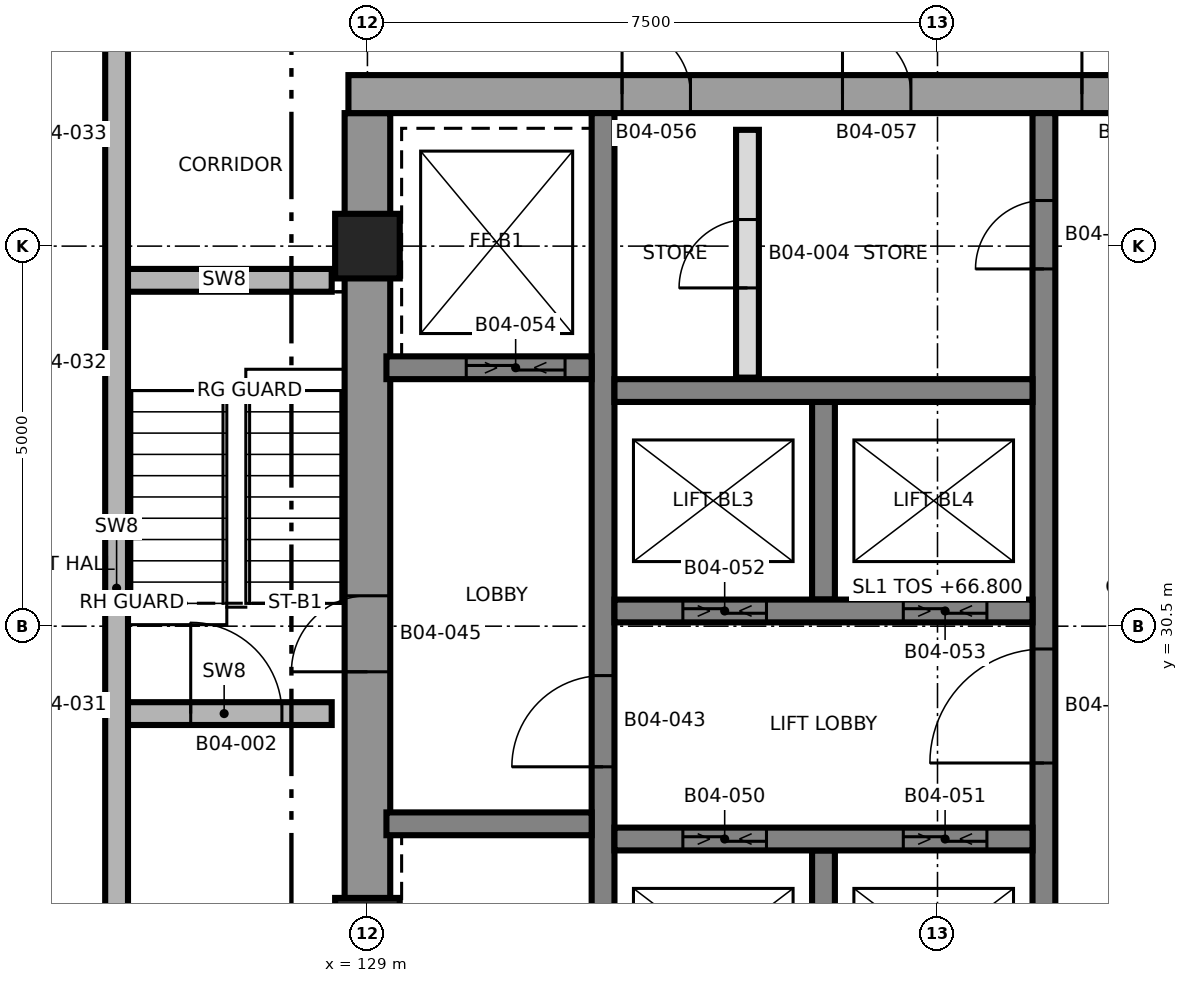
"""IFC4 building model, lengths in metres.
Left out: names, types, materials, properties, quantities, classifications, styles, units other than length and angle.
Written with IfcOpenShell. Run it as: python <this file> out.ifc"""

import sys

from ifc_helpers import new_model, si_unit, direction, frame, frame_2d, origin, origin_2d, place, context, subcontext, project, spatial, rectangle, extrude, element, fill, save


model = new_model("IFC4")
c1 = context("Model", 3, precision=1e-05, world=origin(), true_north=direction((0.0, 1.0)))
c2 = subcontext(c1, "Body", "Model", "MODEL_VIEW")
j1 = project(units=[si_unit("LENGTHUNIT", "METRE"), si_unit("PLANEANGLEUNIT", "RADIAN")], contexts=[c1])
p1 = place(None, origin())
s1 = spatial("IfcSite", under=j1, at=p1, CompositionType="ELEMENT")
p2 = place(p1, origin())
s2 = spatial("IfcBuilding", under=s1, at=p2, CompositionType="ELEMENT")
p3 = place(p2, frame((0.0, 0.0, 66.8)))
s3 = spatial("IfcBuildingStorey", under=s2, at=p3, CompositionType="ELEMENT", Elevation=66.8)
p4 = place(p3, frame((129.0, 24.75, 0.0), z_axis=(0.0, 0.0, 1.0), x_axis=(0.0, 1.0, 0.0)))
e1 = element("IfcWall", 1, at=p4, inside=s3, PredefinedType="SHEAR", context=c2, shape_type="SweptSolid", body=[
    extrude(rectangle(XDim=12.5, YDim=0.6, at=frame_2d((6.25, 0.0))), origin(), (0.0, 0.0, 1.0), 3.7),
])
p5 = place(p4, frame((5.15, 0.0, 0.0)))
e2 = element("IfcOpeningElement", 2, at=p5, cuts=e1, PredefinedType="OPENING", context=c2, shape_type="SweptSolid", body=[
    extrude(rectangle(XDim=1.0, YDim=2.1, at=frame_2d((0.5, 1.05))), frame((0.0, 0.31, 0.0), z_axis=(0.0, -1.0, 0.0), x_axis=(1.0, 0.0, 0.0)), (0.0, 0.0, 1.0), 0.62),
])
p6 = place(p3, frame((128.75, 37.5, 0.0), z_axis=(0.0, 0.0, 1.0), x_axis=(1.0, 0.0, 0.0)))
e3 = element("IfcWall", 3, at=p6, inside=s3, PredefinedType="SHEAR", context=c2, shape_type="SweptSolid", body=[
    extrude(rectangle(XDim=15.0, YDim=0.5, at=frame_2d((7.5, 0.0))), origin(), (0.0, 0.0, 1.0), 3.7),
])
p7 = place(p6, frame((9.65, 0.0, 0.0)))
e4 = element("IfcOpeningElement", 4, at=p7, cuts=e3, PredefinedType="OPENING", context=c2, shape_type="SweptSolid", body=[
    extrude(rectangle(XDim=1.5, YDim=2.1, at=frame_2d((0.75, 1.05))), frame((0.0, 0.26, 0.0), z_axis=(0.0, -1.0, 0.0), x_axis=(1.0, 0.0, 0.0)), (0.0, 0.0, 1.0), 0.52),
])
p8 = place(p6, frame((12.85, 0.0, 0.0)))
e5 = element("IfcOpeningElement", 5, at=p8, cuts=e3, PredefinedType="OPENING", context=c2, shape_type="SweptSolid", body=[
    extrude(rectangle(XDim=0.9, YDim=2.1, at=frame_2d((0.45, 1.05))), frame((0.0, 0.26, 0.0), z_axis=(0.0, -1.0, 0.0), x_axis=(1.0, 0.0, 0.0)), (0.0, 0.0, 1.0), 0.52),
])
p9 = place(p6, frame((3.6, 0.0, 0.0)))
e6 = element("IfcOpeningElement", 6, at=p9, cuts=e3, PredefinedType="OPENING", context=c2, shape_type="SweptSolid", body=[
    extrude(rectangle(XDim=0.9, YDim=2.1, at=frame_2d((0.45, 1.05))), frame((0.0, 0.26, 0.0), z_axis=(0.0, -1.0, 0.0), x_axis=(1.0, 0.0, 0.0)), (0.0, 0.0, 1.0), 0.52),
])
p10 = place(p6, frame((6.5, 0.0, 0.0)))
e7 = element("IfcOpeningElement", 7, at=p10, cuts=e3, PredefinedType="OPENING", context=c2, shape_type="SweptSolid", body=[
    extrude(rectangle(XDim=0.9, YDim=2.1, at=frame_2d((0.45, 1.05))), frame((0.0, 0.26, 0.0), z_axis=(0.0, -1.0, 0.0), x_axis=(1.0, 0.0, 0.0)), (0.0, 0.0, 1.0), 0.52),
])
p11 = place(p3, frame((132.1, 24.75, 0.0), z_axis=(0.0, 0.0, 1.0), x_axis=(0.0, 1.0, 0.0)))
e8 = element("IfcWall", 8, at=p11, inside=s3, PredefinedType="SHEAR", context=c2, shape_type="SweptSolid", body=[
    extrude(rectangle(XDim=12.5, YDim=0.3, at=frame_2d((6.25, 0.0))), origin(), (0.0, 0.0, 1.0), 3.7),
])
p12 = place(p11, frame((3.9, 0.0, 0.0)))
e9 = element("IfcOpeningElement", 9, at=p12, cuts=e8, PredefinedType="OPENING", context=c2, shape_type="SweptSolid", body=[
    extrude(rectangle(XDim=1.2, YDim=2.1, at=frame_2d((0.6, 1.05))), frame((0.0, 0.16, 0.0), z_axis=(0.0, -1.0, 0.0), x_axis=(1.0, 0.0, 0.0)), (0.0, 0.0, 1.0), 0.32),
])
p13 = place(p3, frame((137.9, 24.75, 0.0), z_axis=(0.0, 0.0, 1.0), x_axis=(0.0, 1.0, 0.0)))
e10 = element("IfcWall", 10, at=p13, inside=s3, PredefinedType="SHEAR", context=c2, shape_type="SweptSolid", body=[
    extrude(rectangle(XDim=12.5, YDim=0.3, at=frame_2d((6.25, 0.0))), origin(), (0.0, 0.0, 1.0), 3.7),
])
p14 = place(p13, frame((3.95, 0.0, 0.0)))
e11 = element("IfcOpeningElement", 11, at=p14, cuts=e10, PredefinedType="OPENING", context=c2, shape_type="SweptSolid", body=[
    extrude(rectangle(XDim=1.5, YDim=2.1, at=frame_2d((0.75, 1.05))), frame((0.0, 0.16, 0.0), z_axis=(0.0, -1.0, 0.0), x_axis=(1.0, 0.0, 0.0)), (0.0, 0.0, 1.0), 0.32),
])
p15 = place(p13, frame((10.45, 0.0, 0.0)))
e12 = element("IfcOpeningElement", 12, at=p15, cuts=e10, PredefinedType="OPENING", context=c2, shape_type="SweptSolid", body=[
    extrude(rectangle(XDim=0.9, YDim=2.1, at=frame_2d((0.45, 1.05))), frame((0.0, 0.16, 0.0), z_axis=(0.0, -1.0, 0.0), x_axis=(1.0, 0.0, 0.0)), (0.0, 0.0, 1.0), 0.32),
])
p16 = place(p3, frame((135.0, 24.75, 0.0), z_axis=(0.0, 0.0, 1.0), x_axis=(0.0, 1.0, 0.0)))
e13 = element("IfcWall", 13, at=p16, inside=s3, PredefinedType="SHEAR", context=c2, shape_type="SweptSolid", body=[
    extrude(rectangle(XDim=2.8, YDim=0.3, at=frame_2d((1.4, 0.0))), origin(), (0.0, 0.0, 1.0), 3.7),
])
p17 = place(p3, frame((135.0, 30.85, 0.0), z_axis=(0.0, 0.0, 1.0), x_axis=(0.0, 1.0, 0.0)))
e14 = element("IfcWall", 14, at=p17, inside=s3, PredefinedType="SHEAR", context=c2, shape_type="SweptSolid", body=[
    extrude(rectangle(XDim=2.6, YDim=0.3, at=frame_2d((1.3, 0.0))), origin(), (0.0, 0.0, 1.0), 3.7),
])
p18 = place(p3, frame((132.25, 27.7, 0.0), z_axis=(0.0, 0.0, 1.0), x_axis=(1.0, 0.0, 0.0)))
e15 = element("IfcWall", 15, at=p18, inside=s3, PredefinedType="SHEAR", context=c2, shape_type="SweptSolid", body=[
    extrude(rectangle(XDim=5.5, YDim=0.3, at=frame_2d((2.75, 0.0))), origin(), (0.0, 0.0, 1.0), 3.7),
])
p19 = place(p18, frame((0.9, 0.0, 0.0)))
e16 = element("IfcOpeningElement", 16, at=p19, cuts=e15, PredefinedType="OPENING", context=c2, shape_type="SweptSolid", body=[
    extrude(rectangle(XDim=1.1, YDim=2.4, at=frame_2d((0.55, 1.2))), frame((0.0, 0.16, 0.0), z_axis=(0.0, -1.0, 0.0), x_axis=(1.0, 0.0, 0.0)), (0.0, 0.0, 1.0), 0.32),
])
p20 = place(p18, frame((3.8, 0.0, 0.0)))
e17 = element("IfcOpeningElement", 17, at=p20, cuts=e15, PredefinedType="OPENING", context=c2, shape_type="SweptSolid", body=[
    extrude(rectangle(XDim=1.1, YDim=2.4, at=frame_2d((0.55, 1.2))), frame((0.0, 0.16, 0.0), z_axis=(0.0, -1.0, 0.0), x_axis=(1.0, 0.0, 0.0)), (0.0, 0.0, 1.0), 0.32),
])
p21 = place(p3, frame((132.25, 30.7, 0.0), z_axis=(0.0, 0.0, 1.0), x_axis=(1.0, 0.0, 0.0)))
e18 = element("IfcWall", 18, at=p21, inside=s3, PredefinedType="SHEAR", context=c2, shape_type="SweptSolid", body=[
    extrude(rectangle(XDim=5.5, YDim=0.3, at=frame_2d((2.75, 0.0))), origin(), (0.0, 0.0, 1.0), 3.7),
])
p22 = place(p21, frame((0.9, 0.0, 0.0)))
e19 = element("IfcOpeningElement", 19, at=p22, cuts=e18, PredefinedType="OPENING", context=c2, shape_type="SweptSolid", body=[
    extrude(rectangle(XDim=1.1, YDim=2.4, at=frame_2d((0.55, 1.2))), frame((0.0, 0.16, 0.0), z_axis=(0.0, -1.0, 0.0), x_axis=(1.0, 0.0, 0.0)), (0.0, 0.0, 1.0), 0.32),
])
p23 = place(p21, frame((3.8, 0.0, 0.0)))
e20 = element("IfcOpeningElement", 20, at=p23, cuts=e18, PredefinedType="OPENING", context=c2, shape_type="SweptSolid", body=[
    extrude(rectangle(XDim=1.1, YDim=2.4, at=frame_2d((0.55, 1.2))), frame((0.0, 0.16, 0.0), z_axis=(0.0, -1.0, 0.0), x_axis=(1.0, 0.0, 0.0)), (0.0, 0.0, 1.0), 0.32),
])
p24 = place(p3, frame((132.25, 33.6, 0.0), z_axis=(0.0, 0.0, 1.0), x_axis=(1.0, 0.0, 0.0)))
e21 = element("IfcWall", 21, at=p24, inside=s3, PredefinedType="SHEAR", context=c2, shape_type="SweptSolid", body=[
    extrude(rectangle(XDim=5.5, YDim=0.3, at=frame_2d((2.75, 0.0))), origin(), (0.0, 0.0, 1.0), 3.7),
])
p25 = place(p3, frame((129.25, 27.9, 0.0), z_axis=(0.0, 0.0, 1.0), x_axis=(1.0, 0.0, 0.0)))
e22 = element("IfcWall", 22, at=p25, inside=s3, PredefinedType="SHEAR", context=c2, shape_type="SweptSolid", body=[
    extrude(rectangle(XDim=2.7, YDim=0.3, at=frame_2d((1.35, 0.0))), origin(), (0.0, 0.0, 1.0), 3.7),
])
p26 = place(p3, frame((129.25, 33.9, 0.0), z_axis=(0.0, 0.0, 1.0), x_axis=(1.0, 0.0, 0.0)))
e23 = element("IfcWall", 23, at=p26, inside=s3, PredefinedType="SHEAR", context=c2, shape_type="SweptSolid", body=[
    extrude(rectangle(XDim=2.7, YDim=0.3, at=frame_2d((1.35, 0.0))), origin(), (0.0, 0.0, 1.0), 3.7),
])
p27 = place(p26, frame((1.05, 0.0, 0.0)))
e24 = element("IfcOpeningElement", 24, at=p27, cuts=e23, PredefinedType="OPENING", context=c2, shape_type="SweptSolid", body=[
    extrude(rectangle(XDim=1.3, YDim=2.4, at=frame_2d((0.65, 1.2))), frame((0.0, 0.16, 0.0), z_axis=(0.0, -1.0, 0.0), x_axis=(1.0, 0.0, 0.0)), (0.0, 0.0, 1.0), 0.32),
])
for number, where, z_axis, x_axis in (
    (25, (129.0, 26.5, 0.0), (0.0, 0.0, 1.0), (1.0, 0.0, 0.0)),
    (26, (129.0, 35.5, 0.0), (0.0, 0.0, 1.0), (1.0, 0.0, 0.0)),
):
    element("IfcColumn", number, at=place(p3, frame(where, z_axis=z_axis, x_axis=x_axis)), inside=s3, PredefinedType="COLUMN", context=c2, shape_type="SweptSolid", body=[
        extrude(rectangle(XDim=0.85, YDim=0.85, at=origin_2d()), origin(), (0.0, 0.0, 1.0), 3.7),
    ])
p28 = place(p3, frame((125.7, 29.35, 0.0), z_axis=(0.0, 0.0, 1.0), x_axis=(1.0, 0.0, 0.0)))
e27 = element("IfcWall", 27, at=p28, inside=s3, PredefinedType="SHEAR", context=c2, shape_type="SweptSolid", body=[
    extrude(rectangle(XDim=2.83, YDim=0.3, at=frame_2d((1.415, 0.0))), origin(), (0.0, 0.0, 1.0), 3.4),
])
p29 = place(p28, frame((0.975, 0.0, 0.0)))
e28 = element("IfcOpeningElement", 28, at=p29, cuts=e27, PredefinedType="OPENING", context=c2, shape_type="SweptSolid", body=[
    extrude(rectangle(XDim=1.2, YDim=2.1, at=frame_2d((0.6, 1.05))), frame((0.0, 0.16, 0.0), z_axis=(0.0, -1.0, 0.0), x_axis=(1.0, 0.0, 0.0)), (0.0, 0.0, 1.0), 0.32),
])
p30 = place(p3, frame((125.7, 35.05, 0.0), z_axis=(0.0, 0.0, 1.0), x_axis=(1.0, 0.0, 0.0)))
e29 = element("IfcWall", 29, at=p30, inside=s3, PredefinedType="SHEAR", context=c2, shape_type="SweptSolid", body=[
    extrude(rectangle(XDim=2.83, YDim=0.3, at=frame_2d((1.415, 0.0))), origin(), (0.0, 0.0, 1.0), 3.4),
])
p31 = place(p3, frame((125.7, 22.15, 0.0), z_axis=(0.0, 0.0, 1.0), x_axis=(0.0, 1.0, 0.0)))
e30 = element("IfcWall", 30, at=p31, inside=s3, PredefinedType="SHEAR", context=c2, shape_type="SweptSolid", body=[
    extrude(rectangle(XDim=17.7, YDim=0.3, at=frame_2d((8.85, 0.0))), origin(), (0.0, 0.0, 1.0), 3.4),
])
p32 = place(p31, frame((2.7, 0.0, 0.0)))
e31 = element("IfcOpeningElement", 31, at=p32, cuts=e30, PredefinedType="OPENING", context=c2, shape_type="SweptSolid", body=[
    extrude(rectangle(XDim=1.0, YDim=2.1, at=frame_2d((0.5, 1.05))), frame((0.0, 0.16, 0.0), z_axis=(0.0, -1.0, 0.0), x_axis=(1.0, 0.0, 0.0)), (0.0, 0.0, 1.0), 0.32),
])
p33 = place(p3, frame((134.0, 33.77, 0.0), z_axis=(0.0, 0.0, 1.0), x_axis=(0.0, 1.0, 0.0)))
e32 = element("IfcWall", 32, at=p33, inside=s3, PredefinedType="PARTITIONING", context=c2, shape_type="SweptSolid", body=[
    extrude(rectangle(XDim=3.26, YDim=0.3, at=frame_2d((1.63, 0.0))), origin(), (0.0, 0.0, 1.0), 3.4),
])
p34 = place(p33, frame((1.18, 0.0, 0.0)))
e33 = element("IfcOpeningElement", 33, at=p34, cuts=e32, PredefinedType="OPENING", context=c2, shape_type="SweptSolid", body=[
    extrude(rectangle(XDim=0.9, YDim=2.1, at=frame_2d((0.45, 1.05))), frame((0.0, 0.16, 0.0), z_axis=(0.0, -1.0, 0.0), x_axis=(1.0, 0.0, 0.0)), (0.0, 0.0, 1.0), 0.32),
])
p35 = place(p29, origin())
e34 = element("IfcDoor", 34, at=p35, inside=s3, OperationType="SINGLE_SWING_RIGHT", PredefinedType="DOOR", context=c2, shape_type="SweptSolid", body=[
    extrude(rectangle(XDim=1.2, YDim=2.1, at=frame_2d((0.6, 1.05))), frame((0.0, 0.025, 0.0), z_axis=(0.0, -1.0, 0.0), x_axis=(1.0, 0.0, 0.0)), (0.0, 0.0, 1.0), 0.05),
])
fill(e28, e34)
p36 = place(p34, origin())
e35 = element("IfcDoor", 35, at=p36, inside=s3, OperationType="SINGLE_SWING_RIGHT", PredefinedType="DOOR", context=c2, shape_type="SweptSolid", body=[
    extrude(rectangle(XDim=0.9, YDim=2.1, at=frame_2d((0.45, 1.05))), frame((0.0, 0.025, 0.0), z_axis=(0.0, -1.0, 0.0), x_axis=(1.0, 0.0, 0.0)), (0.0, 0.0, 1.0), 0.05),
])
fill(e33, e35)
p37 = place(p14, origin())
e36 = element("IfcDoor", 36, at=p37, inside=s3, OperationType="SINGLE_SWING_RIGHT", PredefinedType="DOOR", context=c2, shape_type="SweptSolid", body=[
    extrude(rectangle(XDim=1.5, YDim=2.1, at=frame_2d((0.75, 1.05))), frame((0.0, 0.025, 0.0), z_axis=(0.0, -1.0, 0.0), x_axis=(1.0, 0.0, 0.0)), (0.0, 0.0, 1.0), 0.05),
])
fill(e11, e36)
p38 = place(p12, origin())
e37 = element("IfcDoor", 37, at=p38, inside=s3, OperationType="SINGLE_SWING_LEFT", PredefinedType="DOOR", context=c2, shape_type="SweptSolid", body=[
    extrude(rectangle(XDim=1.2, YDim=2.1, at=frame_2d((0.6, 1.05))), frame((0.0, 0.025, 0.0), z_axis=(0.0, -1.0, 0.0), x_axis=(1.0, 0.0, 0.0)), (0.0, 0.0, 1.0), 0.05),
])
fill(e9, e37)
p39 = place(p5, origin())
e38 = element("IfcDoor", 38, at=p39, inside=s3, OperationType="SINGLE_SWING_RIGHT", PredefinedType="DOOR", context=c2, shape_type="SweptSolid", body=[
    extrude(rectangle(XDim=1.0, YDim=2.1, at=frame_2d((0.5, 1.05))), frame((0.0, 0.025, 0.0), z_axis=(0.0, -1.0, 0.0), x_axis=(1.0, 0.0, 0.0)), (0.0, 0.0, 1.0), 0.05),
])
fill(e2, e38)
p40 = place(p7, origin())
e39 = element("IfcDoor", 39, at=p40, inside=s3, OperationType="SINGLE_SWING_RIGHT", PredefinedType="DOOR", context=c2, shape_type="SweptSolid", body=[
    extrude(rectangle(XDim=1.5, YDim=2.1, at=frame_2d((0.75, 1.05))), frame((0.0, 0.025, 0.0), z_axis=(0.0, -1.0, 0.0), x_axis=(1.0, 0.0, 0.0)), (0.0, 0.0, 1.0), 0.05),
])
fill(e4, e39)
p41 = place(p19, origin())
e40 = element("IfcDoor", 40, at=p41, inside=s3, OperationType="SLIDING_TO_LEFT", PredefinedType="DOOR", context=c2, shape_type="SweptSolid", body=[
    extrude(rectangle(XDim=1.1, YDim=2.4, at=frame_2d((0.55, 1.2))), frame((0.0, 0.025, 0.0), z_axis=(0.0, -1.0, 0.0), x_axis=(1.0, 0.0, 0.0)), (0.0, 0.0, 1.0), 0.05),
])
fill(e16, e40)
p42 = place(p20, origin())
e41 = element("IfcDoor", 41, at=p42, inside=s3, OperationType="SLIDING_TO_LEFT", PredefinedType="DOOR", context=c2, shape_type="SweptSolid", body=[
    extrude(rectangle(XDim=1.1, YDim=2.4, at=frame_2d((0.55, 1.2))), frame((0.0, 0.025, 0.0), z_axis=(0.0, -1.0, 0.0), x_axis=(1.0, 0.0, 0.0)), (0.0, 0.0, 1.0), 0.05),
])
fill(e17, e41)
p43 = place(p22, origin())
e42 = element("IfcDoor", 42, at=p43, inside=s3, OperationType="SLIDING_TO_LEFT", PredefinedType="DOOR", context=c2, shape_type="SweptSolid", body=[
    extrude(rectangle(XDim=1.1, YDim=2.4, at=frame_2d((0.55, 1.2))), frame((0.0, 0.025, 0.0), z_axis=(0.0, -1.0, 0.0), x_axis=(1.0, 0.0, 0.0)), (0.0, 0.0, 1.0), 0.05),
])
fill(e19, e42)
p44 = place(p23, origin())
e43 = element("IfcDoor", 43, at=p44, inside=s3, OperationType="SLIDING_TO_LEFT", PredefinedType="DOOR", context=c2, shape_type="SweptSolid", body=[
    extrude(rectangle(XDim=1.1, YDim=2.4, at=frame_2d((0.55, 1.2))), frame((0.0, 0.025, 0.0), z_axis=(0.0, -1.0, 0.0), x_axis=(1.0, 0.0, 0.0)), (0.0, 0.0, 1.0), 0.05),
])
fill(e20, e43)
p45 = place(p27, origin())
e44 = element("IfcDoor", 44, at=p45, inside=s3, OperationType="SLIDING_TO_LEFT", PredefinedType="DOOR", context=c2, shape_type="SweptSolid", body=[
    extrude(rectangle(XDim=1.3, YDim=2.4, at=frame_2d((0.65, 1.2))), frame((0.0, 0.025, 0.0), z_axis=(0.0, -1.0, 0.0), x_axis=(1.0, 0.0, 0.0)), (0.0, 0.0, 1.0), 0.05),
])
fill(e24, e44)
p46 = place(p9, origin())
e45 = element("IfcDoor", 45, at=p46, inside=s3, OperationType="SINGLE_SWING_LEFT", PredefinedType="DOOR", context=c2, shape_type="SweptSolid", body=[
    extrude(rectangle(XDim=0.9, YDim=2.1, at=frame_2d((0.45, 1.05))), frame((0.0, 0.025, 0.0), z_axis=(0.0, -1.0, 0.0), x_axis=(1.0, 0.0, 0.0)), (0.0, 0.0, 1.0), 0.05),
])
fill(e6, e45)
p47 = place(p10, origin())
e46 = element("IfcDoor", 46, at=p47, inside=s3, OperationType="SINGLE_SWING_RIGHT", PredefinedType="DOOR", context=c2, shape_type="SweptSolid", body=[
    extrude(rectangle(XDim=0.9, YDim=2.1, at=frame_2d((0.45, 1.05))), frame((0.0, 0.025, 0.0), z_axis=(0.0, -1.0, 0.0), x_axis=(1.0, 0.0, 0.0)), (0.0, 0.0, 1.0), 0.05),
])
fill(e7, e46)
p48 = place(p15, origin())
e47 = element("IfcDoor", 47, at=p48, inside=s3, OperationType="SINGLE_SWING_RIGHT", PredefinedType="DOOR", context=c2, shape_type="SweptSolid", body=[
    extrude(rectangle(XDim=0.9, YDim=2.1, at=frame_2d((0.45, 1.05))), frame((0.0, 0.025, 0.0), z_axis=(0.0, -1.0, 0.0), x_axis=(1.0, 0.0, 0.0)), (0.0, 0.0, 1.0), 0.05),
])
fill(e12, e47)
save(model, sys.argv[1])
